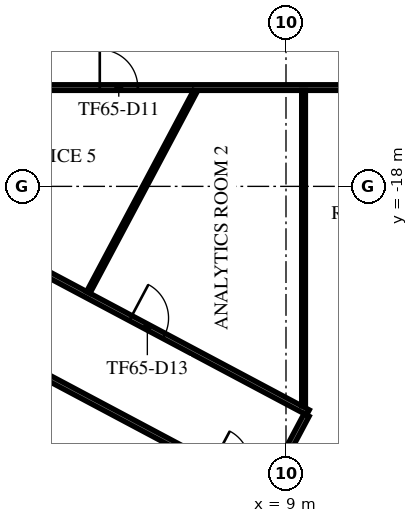
"""IFC4 building model, lengths in metres.
Left out: names, types, materials, properties, quantities, classifications, styles, units other than length and angle.
Written with IfcOpenShell. Run it as: python <this file> out.ifc"""

import sys

from ifc_helpers import new_model, si_unit, direction, frame, frame_2d, origin, place, context, subcontext, project, spatial, rectangle, extrude, element, fill, save


model = new_model("IFC4")
c1 = context("Model", 3, precision=1e-05, world=origin(), true_north=direction((0.0, 1.0)))
c2 = subcontext(c1, "Body", "Model", "MODEL_VIEW")
j1 = project(units=[si_unit("LENGTHUNIT", "METRE"), si_unit("PLANEANGLEUNIT", "RADIAN")], contexts=[c1])
p1 = place(None, origin())
s1 = spatial("IfcSite", under=j1, at=p1, CompositionType="ELEMENT")
p2 = place(p1, origin())
s2 = spatial("IfcBuilding", under=s1, at=p2, CompositionType="ELEMENT")
p3 = place(p2, frame((0.0, 0.0, 274.9)))
s3 = spatial("IfcBuildingStorey", under=s2, at=p3, CompositionType="ELEMENT", Elevation=274.9)
p4 = place(p3, frame((9.233, -32.479, 0.0), z_axis=(0.0, 0.0, 1.0), x_axis=(0.469468429065, 0.882949259081, 0.0)))
e1 = element("IfcWall", 1, at=p4, inside=s3, PredefinedType="STANDARD", context=c2, shape_type="SweptSolid", body=[
    extrude(rectangle(XDim=48.686, YDim=0.6, at=frame_2d((24.343, 0.0))), origin(), (0.0, 0.0, 1.0), 3.64),
])
p5 = place(p4, frame((1.213, 0.0, 0.9)))
e2 = element("IfcOpeningElement", 2, at=p5, cuts=e1, PredefinedType="OPENING", context=c2, shape_type="SweptSolid", body=[
    extrude(rectangle(XDim=2.0, YDim=2.1, at=frame_2d((1.0, 1.05))), frame((0.0, 0.31, 0.0), z_axis=(0.0, -1.0, 0.0), x_axis=(1.0, 0.0, 0.0)), (0.0, 0.0, 1.0), 0.62),
])
p6 = place(p4, frame((5.639, 0.0, 0.9)))
e3 = element("IfcOpeningElement", 3, at=p6, cuts=e1, PredefinedType="OPENING", context=c2, shape_type="SweptSolid", body=[
    extrude(rectangle(XDim=2.0, YDim=2.1, at=frame_2d((1.0, 1.05))), frame((0.0, 0.31, 0.0), z_axis=(0.0, -1.0, 0.0), x_axis=(1.0, 0.0, 0.0)), (0.0, 0.0, 1.0), 0.62),
])
p7 = place(p4, frame((10.065, 0.0, 0.9)))
e4 = element("IfcOpeningElement", 4, at=p7, cuts=e1, PredefinedType="OPENING", context=c2, shape_type="SweptSolid", body=[
    extrude(rectangle(XDim=2.0, YDim=2.1, at=frame_2d((1.0, 1.05))), frame((0.0, 0.31, 0.0), z_axis=(0.0, -1.0, 0.0), x_axis=(1.0, 0.0, 0.0)), (0.0, 0.0, 1.0), 0.62),
])
p8 = place(p4, frame((14.491, 0.0, 0.9)))
e5 = element("IfcOpeningElement", 5, at=p8, cuts=e1, PredefinedType="OPENING", context=c2, shape_type="SweptSolid", body=[
    extrude(rectangle(XDim=2.0, YDim=2.1, at=frame_2d((1.0, 1.05))), frame((0.0, 0.31, 0.0), z_axis=(0.0, -1.0, 0.0), x_axis=(1.0, 0.0, 0.0)), (0.0, 0.0, 1.0), 0.62),
])
p9 = place(p4, frame((18.917, 0.0, 0.9)))
e6 = element("IfcOpeningElement", 6, at=p9, cuts=e1, PredefinedType="OPENING", context=c2, shape_type="SweptSolid", body=[
    extrude(rectangle(XDim=2.0, YDim=2.1, at=frame_2d((1.0, 1.05))), frame((0.0, 0.31, 0.0), z_axis=(0.0, -1.0, 0.0), x_axis=(1.0, 0.0, 0.0)), (0.0, 0.0, 1.0), 0.62),
])
p10 = place(p4, frame((23.343, 0.0, 0.9)))
e7 = element("IfcOpeningElement", 7, at=p10, cuts=e1, PredefinedType="OPENING", context=c2, shape_type="SweptSolid", body=[
    extrude(rectangle(XDim=2.0, YDim=2.1, at=frame_2d((1.0, 1.05))), frame((0.0, 0.31, 0.0), z_axis=(0.0, -1.0, 0.0), x_axis=(1.0, 0.0, 0.0)), (0.0, 0.0, 1.0), 0.62),
])
p11 = place(p4, frame((27.769, 0.0, 0.9)))
e8 = element("IfcOpeningElement", 8, at=p11, cuts=e1, PredefinedType="OPENING", context=c2, shape_type="SweptSolid", body=[
    extrude(rectangle(XDim=2.0, YDim=2.1, at=frame_2d((1.0, 1.05))), frame((0.0, 0.31, 0.0), z_axis=(0.0, -1.0, 0.0), x_axis=(1.0, 0.0, 0.0)), (0.0, 0.0, 1.0), 0.62),
])
p12 = place(p4, frame((32.195, 0.0, 0.9)))
e9 = element("IfcOpeningElement", 9, at=p12, cuts=e1, PredefinedType="OPENING", context=c2, shape_type="SweptSolid", body=[
    extrude(rectangle(XDim=2.0, YDim=2.1, at=frame_2d((1.0, 1.05))), frame((0.0, 0.31, 0.0), z_axis=(0.0, -1.0, 0.0), x_axis=(1.0, 0.0, 0.0)), (0.0, 0.0, 1.0), 0.62),
])
p13 = place(p4, frame((36.621, 0.0, 0.9)))
e10 = element("IfcOpeningElement", 10, at=p13, cuts=e1, PredefinedType="OPENING", context=c2, shape_type="SweptSolid", body=[
    extrude(rectangle(XDim=2.0, YDim=2.1, at=frame_2d((1.0, 1.05))), frame((0.0, 0.31, 0.0), z_axis=(0.0, -1.0, 0.0), x_axis=(1.0, 0.0, 0.0)), (0.0, 0.0, 1.0), 0.62),
])
p14 = place(p4, frame((41.047, 0.0, 0.9)))
e11 = element("IfcOpeningElement", 11, at=p14, cuts=e1, PredefinedType="OPENING", context=c2, shape_type="SweptSolid", body=[
    extrude(rectangle(XDim=2.0, YDim=2.1, at=frame_2d((1.0, 1.05))), frame((0.0, 0.31, 0.0), z_axis=(0.0, -1.0, 0.0), x_axis=(1.0, 0.0, 0.0)), (0.0, 0.0, 1.0), 0.62),
])
p15 = place(p4, frame((45.473, 0.0, 0.9)))
e12 = element("IfcOpeningElement", 12, at=p15, cuts=e1, PredefinedType="OPENING", context=c2, shape_type="SweptSolid", body=[
    extrude(rectangle(XDim=2.0, YDim=2.1, at=frame_2d((1.0, 1.05))), frame((0.0, 0.31, 0.0), z_axis=(0.0, -1.0, 0.0), x_axis=(1.0, 0.0, 0.0)), (0.0, 0.0, 1.0), 0.62),
])
p16 = place(p3, frame((-26.271, -7.606, 0.0), z_axis=(0.0, 0.0, 1.0), x_axis=(0.882946860375, -0.469472940385, 0.0)))
e13 = element("IfcWall", 13, at=p16, inside=s3, PredefinedType="PARTITIONING", context=c2, shape_type="SweptSolid", body=[
    extrude(rectangle(XDim=39.325, YDim=0.15, at=frame_2d((19.662, 0.0))), origin(), (0.0, 0.0, 1.0), 3.04),
])
p17 = place(p16, frame((2.8, 0.0, 0.0)))
e14 = element("IfcOpeningElement", 14, at=p17, cuts=e13, PredefinedType="OPENING", context=c2, shape_type="SweptSolid", body=[
    extrude(rectangle(XDim=1.0, YDim=2.1, at=frame_2d((0.5, 1.05))), frame((0.0, 0.085, 0.0), z_axis=(0.0, -1.0, 0.0), x_axis=(1.0, 0.0, 0.0)), (0.0, 0.0, 1.0), 0.17),
])
p18 = place(p16, frame((6.915, 0.0, 0.0)))
e15 = element("IfcOpeningElement", 15, at=p18, cuts=e13, PredefinedType="OPENING", context=c2, shape_type="SweptSolid", body=[
    extrude(rectangle(XDim=1.0, YDim=2.1, at=frame_2d((0.5, 1.05))), frame((0.0, 0.085, 0.0), z_axis=(0.0, -1.0, 0.0), x_axis=(1.0, 0.0, 0.0)), (0.0, 0.0, 1.0), 0.17),
])
p19 = place(p16, frame((14.499, 0.0, 0.0)))
e16 = element("IfcOpeningElement", 16, at=p19, cuts=e13, PredefinedType="OPENING", context=c2, shape_type="SweptSolid", body=[
    extrude(rectangle(XDim=1.0, YDim=2.1, at=frame_2d((0.5, 1.05))), frame((0.0, 0.085, 0.0), z_axis=(0.0, -1.0, 0.0), x_axis=(1.0, 0.0, 0.0)), (0.0, 0.0, 1.0), 0.17),
])
p20 = place(p16, frame((25.785, 0.0, 0.0)))
e17 = element("IfcOpeningElement", 17, at=p20, cuts=e13, PredefinedType="OPENING", context=c2, shape_type="SweptSolid", body=[
    extrude(rectangle(XDim=1.0, YDim=2.1, at=frame_2d((0.5, 1.05))), frame((0.0, 0.085, 0.0), z_axis=(0.0, -1.0, 0.0), x_axis=(1.0, 0.0, 0.0)), (0.0, 0.0, 1.0), 0.17),
])
p21 = place(p16, frame((37.741, 0.0, 0.0)))
e18 = element("IfcOpeningElement", 18, at=p21, cuts=e13, PredefinedType="OPENING", context=c2, shape_type="SweptSolid", body=[
    extrude(rectangle(XDim=1.0, YDim=2.1, at=frame_2d((0.5, 1.05))), frame((0.0, 0.085, 0.0), z_axis=(0.0, -1.0, 0.0), x_axis=(1.0, 0.0, 0.0)), (0.0, 0.0, 1.0), 0.17),
])
p22 = place(p3, frame((-6.501, -15.4, 0.0), z_axis=(0.0, 0.0, 1.0), x_axis=(0.882952324659, -0.469462663456, 0.0)))
e19 = element("IfcWall", 19, at=p22, inside=s3, PredefinedType="PARTITIONING", context=c2, shape_type="SweptSolid", body=[
    extrude(rectangle(XDim=18.21, YDim=0.15, at=frame_2d((9.105, 0.0))), origin(), (0.0, 0.0, 1.0), 3.04),
])
p23 = place(p22, frame((12.924, 0.0, 0.0)))
e20 = element("IfcOpeningElement", 20, at=p23, cuts=e19, PredefinedType="OPENING", context=c2, shape_type="SweptSolid", body=[
    extrude(rectangle(XDim=1.0, YDim=2.1, at=frame_2d((0.5, 1.05))), frame((0.0, 0.085, 0.0), z_axis=(0.0, -1.0, 0.0), x_axis=(1.0, 0.0, 0.0)), (0.0, 0.0, 1.0), 0.17),
])
p24 = place(p3, frame((-6.2, -15.4, 0.0), z_axis=(0.0, 0.0, 1.0), x_axis=(1.0, 0.0, 0.0)))
e21 = element("IfcWall", 21, at=p24, inside=s3, PredefinedType="PARTITIONING", context=c2, shape_type="SweptSolid", body=[
    extrude(rectangle(XDim=21.6, YDim=0.15, at=frame_2d((10.8, 0.0))), origin(), (0.0, 0.0, 1.0), 3.24),
])
p25 = place(p24, frame((10.3, 0.0, 0.0)))
e22 = element("IfcOpeningElement", 22, at=p25, cuts=e21, PredefinedType="OPENING", context=c2, shape_type="SweptSolid", body=[
    extrude(rectangle(XDim=1.0, YDim=2.1, at=frame_2d((0.5, 1.05))), frame((0.0, 0.085, 0.0), z_axis=(0.0, -1.0, 0.0), x_axis=(1.0, 0.0, 0.0)), (0.0, 0.0, 1.0), 0.17),
])
p26 = place(p3, frame((8.486, -26.002, 0.0), z_axis=(0.0, 0.0, 1.0), x_axis=(0.469596777995, 0.882881003361, 0.0)))
e23 = element("IfcWall", 23, at=p26, inside=s3, PredefinedType="PARTITIONING", context=c2, shape_type="SweptSolid", body=[
    extrude(rectangle(XDim=2.25, YDim=0.15, at=frame_2d((1.125, 0.0))), origin(), (0.0, 0.0, 1.0), 3.04),
])
p27 = place(p3, frame((3.797, -20.791, 0.0), z_axis=(0.0, 0.0, 1.0), x_axis=(0.469539343426, 0.882911549916, 0.0)))
e24 = element("IfcWall", 24, at=p27, inside=s3, PredefinedType="PARTITIONING", context=c2, shape_type="SweptSolid", body=[
    extrude(rectangle(XDim=5.994, YDim=0.1, at=frame_2d((2.997, 0.0))), origin(), (0.0, 0.0, 1.0), 3.24),
])
p28 = place(p3, frame((9.462, -23.775, 0.0), z_axis=(0.0, 0.0, 1.0), x_axis=(0.0, 1.0, 0.0)))
e25 = element("IfcWall", 25, at=p28, inside=s3, PredefinedType="PARTITIONING", context=c2, shape_type="SweptSolid", body=[
    extrude(rectangle(XDim=8.3, YDim=0.1, at=frame_2d((4.15, 0.0))), origin(), (0.0, 0.0, 1.0), 3.04),
])
p29 = place(p25, frame((1.0, 0.0, 0.0), z_axis=(0.0, 0.0, 1.0), x_axis=(-1.0, 0.0, 0.0)))
e26 = element("IfcDoor", 26, at=p29, inside=s3, OperationType="SINGLE_SWING_LEFT", PredefinedType="DOOR", context=c2, shape_type="SweptSolid", body=[
    extrude(rectangle(XDim=1.0, YDim=2.1, at=frame_2d((0.5, 1.05))), frame((0.0, 0.025, 0.0), z_axis=(0.0, -1.0, 0.0), x_axis=(1.0, 0.0, 0.0)), (0.0, 0.0, 1.0), 0.05),
])
fill(e22, e26)
p30 = place(p23, origin())
e27 = element("IfcDoor", 27, at=p30, inside=s3, OperationType="SINGLE_SWING_RIGHT", PredefinedType="DOOR", context=c2, shape_type="SweptSolid", body=[
    extrude(rectangle(XDim=1.0, YDim=2.1, at=frame_2d((0.5, 1.05))), frame((0.0, 0.025, 0.0), z_axis=(0.0, -1.0, 0.0), x_axis=(1.0, 0.0, 0.0)), (0.0, 0.0, 1.0), 0.05),
])
fill(e20, e27)
save(model, sys.argv[1])
